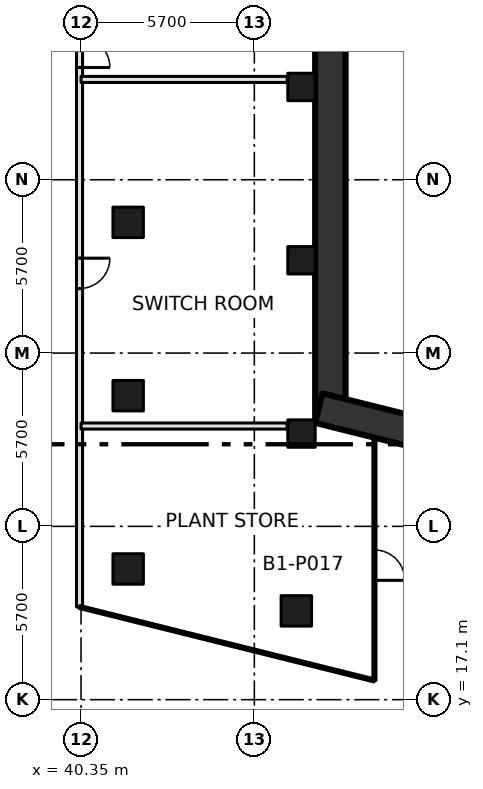
"""IFC4 building model, lengths in metres.
Left out: names, types, materials, properties, quantities, classifications, styles, units other than length and angle.
Written with IfcOpenShell. Run it as: python <this file> out.ifc"""

import sys

from ifc_helpers import new_model, si_unit, direction, frame, frame_2d, origin, origin_2d, place, context, subcontext, project, spatial, rectangle, extrude, element, fill, save


model = new_model("IFC4")
c1 = context("Model", 3, precision=1e-05, world=origin(), true_north=direction((0.0, 1.0)))
c2 = subcontext(c1, "Body", "Model", "MODEL_VIEW")
j1 = project(units=[si_unit("LENGTHUNIT", "METRE"), si_unit("PLANEANGLEUNIT", "RADIAN")], contexts=[c1])
p1 = place(None, origin())
s1 = spatial("IfcSite", under=j1, at=p1, CompositionType="ELEMENT")
p2 = place(p1, origin())
s2 = spatial("IfcBuilding", under=s1, at=p2, CompositionType="ELEMENT")
p3 = place(p2, frame((0.0, 0.0, -4.5)))
s3 = spatial("IfcBuildingStorey", under=s2, at=p3, CompositionType="ELEMENT", Elevation=-4.5)
p4 = place(p3, frame((48.55, 42.797, 0.0), z_axis=(0.0, 0.0, 1.0), x_axis=(0.0, -1.0, 0.0)))
e1 = element("IfcWall", 1, at=p4, inside=s3, PredefinedType="SOLIDWALL", context=c2, shape_type="SweptSolid", body=[
    extrude(rectangle(XDim=16.593, YDim=1.0, at=frame_2d((8.296, 0.0))), origin(), (0.0, 0.0, 1.0), 4.5),
])
p5 = place(p3, frame((48.171, 26.689, 0.0), z_axis=(0.0, 0.0, 1.0), x_axis=(0.970293913122, -0.241929167647, 0.0)))
e2 = element("IfcWall", 2, at=p5, inside=s3, PredefinedType="SOLIDWALL", context=c2, shape_type="SweptSolid", body=[
    extrude(rectangle(XDim=51.533, YDim=1.0, at=frame_2d((25.766, 0.0))), origin(), (0.0, 0.0, 1.0), 4.5),
])
p6 = place(p5, frame((22.766, 0.0, 0.0)))
e3 = element("IfcOpeningElement", 3, at=p6, cuts=e2, PredefinedType="OPENING", context=c2, shape_type="SweptSolid", body=[
    extrude(rectangle(XDim=6.0, YDim=3.2, at=frame_2d((3.0, 1.6))), frame((0.0, 0.51, 0.0), z_axis=(0.0, -1.0, 0.0), x_axis=(1.0, 0.0, 0.0)), (0.0, 0.0, 1.0), 1.02),
])
for number, where, z_axis, x_axis in (
    (4, (41.9, 21.399, 0.0), (0.0, 0.0, 1.0), (1.0, 0.0, 0.0)),
    (5, (47.431, 20.02, 0.0), (0.0, 0.0, 1.0), (1.0, 0.0, 0.0)),
    (6, (41.9, 27.099, 0.0), (0.0, 0.0, 1.0), (1.0, 0.0, 0.0)),
    (7, (41.9, 32.799, 0.0), (0.0, 0.0, 1.0), (1.0, 0.0, 0.0)),
):
    element("IfcColumn", number, at=place(p3, frame(where, z_axis=z_axis, x_axis=x_axis)), inside=s3, PredefinedType="COLUMN", context=c2, shape_type="SweptSolid", body=[
        extrude(rectangle(XDim=1.0, YDim=1.0, at=origin_2d()), origin(), (0.0, 0.0, 1.0), 4.5),
    ])
for number, where, z_axis, x_axis in (
    (8, (47.6, 25.852, 0.0), (0.0, 0.0, 1.0), (1.0, 0.0, 0.0)),
    (9, (47.6, 31.552, 0.0), (0.0, 0.0, 1.0), (1.0, 0.0, 0.0)),
    (10, (47.6, 37.252, 0.0), (0.0, 0.0, 1.0), (1.0, 0.0, 0.0)),
):
    element("IfcColumn", number, at=place(p3, frame(where, z_axis=z_axis, x_axis=x_axis)), inside=s3, PredefinedType="COLUMN", context=c2, shape_type="SweptSolid", body=[
        extrude(rectangle(XDim=0.9, YDim=0.9, at=origin_2d()), origin(), (0.0, 0.0, 1.0), 4.5),
    ])
p7 = place(p3, frame((40.3, 39.172, 0.0), z_axis=(0.0, 0.0, 1.0), x_axis=(0.0, -1.0, 0.0)))
e11 = element("IfcWall", 11, at=p7, inside=s3, PredefinedType="PARTITIONING", context=c2, shape_type="SweptSolid", body=[
    extrude(rectangle(XDim=19.023, YDim=0.2, at=frame_2d((9.512, 0.0))), origin(), (0.0, 0.0, 1.0), 4.05),
])
p8 = place(p7, frame((7.552, 0.0, 0.0)))
e12 = element("IfcOpeningElement", 12, at=p8, cuts=e11, PredefinedType="OPENING", context=c2, shape_type="SweptSolid", body=[
    extrude(rectangle(XDim=1.0, YDim=2.1, at=frame_2d((0.5, 1.05))), frame((0.0, 0.11, 0.0), z_axis=(0.0, -1.0, 0.0), x_axis=(1.0, 0.0, 0.0)), (0.0, 0.0, 1.0), 0.22),
])
p9 = place(p7, frame((0.28, 0.0, 0.0)))
e13 = element("IfcOpeningElement", 13, at=p9, cuts=e11, PredefinedType="OPENING", context=c2, shape_type="SweptSolid", body=[
    extrude(rectangle(XDim=1.0, YDim=2.1, at=frame_2d((0.5, 1.05))), frame((0.0, 0.11, 0.0), z_axis=(0.0, -1.0, 0.0), x_axis=(1.0, 0.0, 0.0)), (0.0, 0.0, 1.0), 0.22),
])
p10 = place(p3, frame((50.0, 17.731, 0.0), z_axis=(0.0, 0.0, 1.0), x_axis=(-0.970307482214, 0.241874740224, 0.0)))
e14 = element("IfcWall", 14, at=p10, inside=s3, PredefinedType="PARTITIONING", context=c2, shape_type="SweptSolid", body=[
    extrude(rectangle(XDim=9.997, YDim=0.1, at=frame_2d((4.999, 0.0))), origin(), (0.0, 0.0, 1.0), 4.05),
])
p11 = place(p3, frame((50.0, 26.171, 0.0), z_axis=(0.0, 0.0, 1.0), x_axis=(0.0, -1.0, 0.0)))
e15 = element("IfcWall", 15, at=p11, inside=s3, PredefinedType="PARTITIONING", context=c2, shape_type="SweptSolid", body=[
    extrude(rectangle(XDim=8.44, YDim=0.1, at=frame_2d((4.22, 0.0))), origin(), (0.0, 0.0, 1.0), 4.05),
])
p12 = place(p11, frame((4.146, 0.0, 0.0)))
e16 = element("IfcOpeningElement", 16, at=p12, cuts=e15, PredefinedType="OPENING", context=c2, shape_type="SweptSolid", body=[
    extrude(rectangle(XDim=1.0, YDim=2.1, at=frame_2d((0.5, 1.05))), frame((0.0, 0.06, 0.0), z_axis=(0.0, -1.0, 0.0), x_axis=(1.0, 0.0, 0.0)), (0.0, 0.0, 1.0), 0.12),
])
for number, where, z_axis, x_axis in (
    (17, (47.13, 26.1, 0.0), (0.0, 0.0, 1.0), (-1.0, 0.0, 0.0)),
    (18, (47.13, 37.5, 0.0), (0.0, 0.0, 1.0), (-1.0, 0.0, 0.0)),
):
    element("IfcWall", number, at=place(p3, frame(where, z_axis=z_axis, x_axis=x_axis)), inside=s3, PredefinedType="PARTITIONING", context=c2, shape_type="SweptSolid", body=[
        extrude(rectangle(XDim=6.78, YDim=0.2, at=frame_2d((3.39, 0.0))), origin(), (0.0, 0.0, 1.0), 4.05),
    ])
p13 = place(p12, origin())
e19 = element("IfcDoor", 19, at=p13, inside=s3, OperationType="SINGLE_SWING_RIGHT", PredefinedType="DOOR", context=c2, shape_type="SweptSolid", body=[
    extrude(rectangle(XDim=1.0, YDim=2.1, at=frame_2d((0.5, 1.05))), frame((0.0, 0.025, 0.0), z_axis=(0.0, -1.0, 0.0), x_axis=(1.0, 0.0, 0.0)), (0.0, 0.0, 1.0), 0.05),
])
fill(e16, e19)
p14 = place(p8, origin())
e20 = element("IfcDoor", 20, at=p14, inside=s3, OperationType="SINGLE_SWING_LEFT", PredefinedType="DOOR", context=c2, shape_type="SweptSolid", body=[
    extrude(rectangle(XDim=1.0, YDim=2.1, at=frame_2d((0.5, 1.05))), frame((0.0, 0.025, 0.0), z_axis=(0.0, -1.0, 0.0), x_axis=(1.0, 0.0, 0.0)), (0.0, 0.0, 1.0), 0.05),
])
fill(e12, e20)
p15 = place(p9, origin())
e21 = element("IfcDoor", 21, at=p15, inside=s3, OperationType="SINGLE_SWING_RIGHT", PredefinedType="DOOR", context=c2, shape_type="SweptSolid", body=[
    extrude(rectangle(XDim=1.0, YDim=2.1, at=frame_2d((0.5, 1.05))), frame((0.0, 0.025, 0.0), z_axis=(0.0, -1.0, 0.0), x_axis=(1.0, 0.0, 0.0)), (0.0, 0.0, 1.0), 0.05),
])
fill(e13, e21)
save(model, sys.argv[1])
